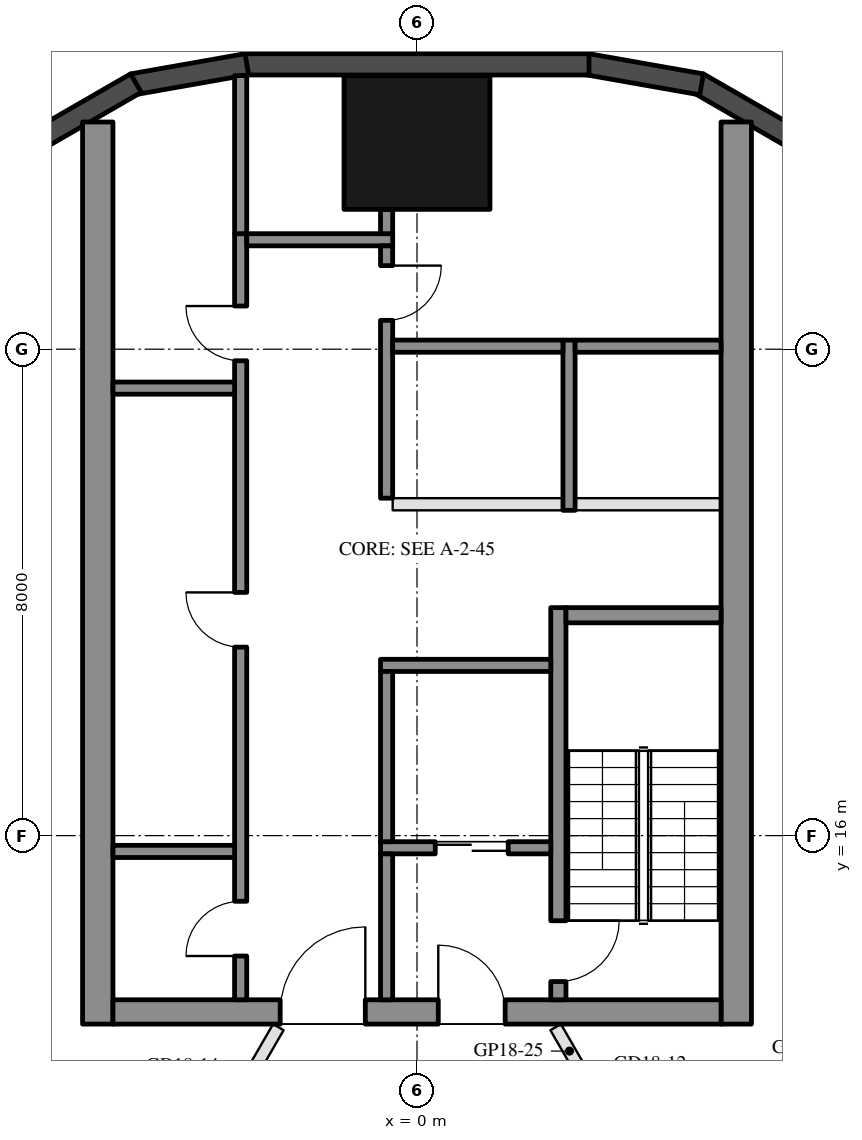
"""IFC4 building model, lengths in metres.
Left out: names, types, materials, properties, quantities, classifications, styles, units other than length and angle.
Written with IfcOpenShell. Run it as: python <this file> out.ifc"""

import sys

from ifc_helpers import new_model, si_unit, direction, frame, frame_2d, origin, origin_2d, place, context, subcontext, project, spatial, rectangle, hollow_rectangle, extrude, element, fill, save


model = new_model("IFC4")
c1 = context("Model", 3, precision=1e-05, world=origin(), true_north=direction((0.0, 1.0)))
c2 = subcontext(c1, "Body", "Model", "MODEL_VIEW")
j1 = project(units=[si_unit("LENGTHUNIT", "METRE"), si_unit("PLANEANGLEUNIT", "RADIAN")], contexts=[c1])
p1 = place(None, origin())
s1 = spatial("IfcSite", under=j1, at=p1, CompositionType="ELEMENT")
p2 = place(p1, origin())
s2 = spatial("IfcBuilding", under=s1, at=p2, CompositionType="ELEMENT")
p3 = place(p2, frame((0.0, 0.0, 194.7)))
s3 = spatial("IfcBuildingStorey", under=s2, at=p3, CompositionType="ELEMENT", Elevation=194.7)
p4 = place(p3, frame((0.0, 27.4, 0.0), z_axis=(0.0, 0.0, 1.0), x_axis=(1.0, 0.0, 0.0)))
e1 = element("IfcColumn", 1, at=p4, inside=s3, PredefinedType="COLUMN", context=c2, shape_type="SweptSolid", body=[
    extrude(hollow_rectangle(XDim=2.4, YDim=2.2, WallThickness=0.06, at=origin_2d()), origin(), (0.0, 0.0, 1.0), 3.7),
])
for number, where, z_axis, x_axis in (
    (2, (6.277, 27.422, 0.0), (0.0, 0.0, 1.0), (-0.866, 0.5, 0.0)),
    (3, (4.68, 28.356, 0.0), (0.0, 0.0, 1.0), (-0.985, 0.174, 0.0)),
):
    element("IfcWall", number, at=place(p3, frame(where, z_axis=z_axis, x_axis=x_axis)), inside=s3, PredefinedType="SOLIDWALL", context=c2, shape_type="SweptSolid", body=[
        extrude(rectangle(XDim=1.91, YDim=0.35, at=frame_2d((0.955, 0.0))), origin(), (0.0, 0.0, 1.0), 3.55),
    ])
p5 = place(p3, frame((2.829, 28.685, 0.0), z_axis=(0.0, 0.0, 1.0), x_axis=(-1.0, 0.0, 0.0)))
e4 = element("IfcWall", 4, at=p5, inside=s3, PredefinedType="SOLIDWALL", context=c2, shape_type="SweptSolid", body=[
    extrude(rectangle(XDim=5.658, YDim=0.35, at=frame_2d((2.829, 0.0))), origin(), (0.0, 0.0, 1.0), 3.55),
])
for number, where, z_axis, x_axis in (
    (5, (-2.799, 28.688, 0.0), (0.0, 0.0, 1.0), (-0.985, -0.174, 0.0)),
    (6, (-4.623, 28.377, 0.0), (0.0, 0.0, 1.0), (-0.866, -0.5, 0.0)),
):
    element("IfcWall", number, at=place(p3, frame(where, z_axis=z_axis, x_axis=x_axis)), inside=s3, PredefinedType="SOLIDWALL", context=c2, shape_type="SweptSolid", body=[
        extrude(rectangle(XDim=1.91, YDim=0.35, at=frame_2d((0.955, 0.0))), origin(), (0.0, 0.0, 1.0), 3.55),
    ])
for number, where, z_axis, x_axis in (
    (7, (5.25, 12.9, 0.0), (0.0, 0.0, 1.0), (0.0, 1.0, 0.0)),
    (8, (-5.25, 12.9, 0.0), (0.0, 0.0, 1.0), (0.0, 1.0, 0.0)),
):
    element("IfcWall", number, at=place(p3, frame(where, z_axis=z_axis, x_axis=x_axis)), inside=s3, PredefinedType="SHEAR", context=c2, shape_type="SweptSolid", body=[
        extrude(rectangle(XDim=14.837, YDim=0.5, at=frame_2d((7.418, 0.0))), origin(), (0.0, 0.0, 1.0), 3.5),
    ])
p6 = place(p3, frame((5.0, 13.1, 0.0), z_axis=(0.0, 0.0, 1.0), x_axis=(-1.0, 0.0, 0.0)))
e9 = element("IfcWall", 9, at=p6, inside=s3, PredefinedType="SHEAR", context=c2, shape_type="SweptSolid", body=[
    extrude(rectangle(XDim=10.0, YDim=0.4, at=frame_2d((5.0, 0.0))), origin(), (0.0, 0.0, 1.0), 3.5),
])
p7 = place(p6, frame((3.55, 0.0, 0.0)))
e10 = element("IfcOpeningElement", 10, at=p7, cuts=e9, PredefinedType="OPENING", context=c2, shape_type="SweptSolid", body=[
    extrude(rectangle(XDim=1.1, YDim=2.1, at=frame_2d((0.55, 1.05))), frame((0.0, 0.21, 0.0), z_axis=(0.0, -1.0, 0.0), x_axis=(1.0, 0.0, 0.0)), (0.0, 0.0, 1.0), 0.42),
])
p8 = place(p6, frame((5.85, 0.0, 0.0)))
e11 = element("IfcOpeningElement", 11, at=p8, cuts=e9, PredefinedType="OPENING", context=c2, shape_type="SweptSolid", body=[
    extrude(rectangle(XDim=1.4, YDim=2.1, at=frame_2d((0.7, 1.05))), frame((0.0, 0.21, 0.0), z_axis=(0.0, -1.0, 0.0), x_axis=(1.0, 0.0, 0.0)), (0.0, 0.0, 1.0), 0.42),
])
p9 = place(p3, frame((2.325, 13.3, 0.0), z_axis=(0.0, 0.0, 1.0), x_axis=(0.0, 1.0, 0.0)))
e12 = element("IfcWall", 12, at=p9, inside=s3, PredefinedType="SHEAR", context=c2, shape_type="SweptSolid", body=[
    extrude(rectangle(XDim=6.45, YDim=0.25, at=frame_2d((3.225, 0.0))), origin(), (0.0, 0.0, 1.0), 3.5),
])
p10 = place(p9, frame((0.3, 0.0, 0.0)))
e13 = element("IfcOpeningElement", 13, at=p10, cuts=e12, PredefinedType="OPENING", context=c2, shape_type="SweptSolid", body=[
    extrude(rectangle(XDim=1.0, YDim=2.1, at=frame_2d((0.5, 1.05))), frame((0.0, 0.135, 0.0), z_axis=(0.0, -1.0, 0.0), x_axis=(1.0, 0.0, 0.0)), (0.0, 0.0, 1.0), 0.27),
])
p11 = place(p3, frame((5.0, 19.625, 0.0), z_axis=(0.0, 0.0, 1.0), x_axis=(-1.0, 0.0, 0.0)))
e14 = element("IfcWall", 14, at=p11, inside=s3, PredefinedType="SHEAR", context=c2, shape_type="SweptSolid", body=[
    extrude(rectangle(XDim=2.55, YDim=0.25, at=frame_2d((1.275, 0.0))), origin(), (0.0, 0.0, 1.0), 3.5),
])
p12 = place(p3, frame((2.2, 18.8, 0.0), z_axis=(0.0, 0.0, 1.0), x_axis=(-1.0, 0.0, 0.0)))
e15 = element("IfcWall", 15, at=p12, inside=s3, PredefinedType="SHEAR", context=c2, shape_type="SweptSolid", body=[
    extrude(rectangle(XDim=2.8, YDim=0.2, at=frame_2d((1.4, 0.0))), origin(), (0.0, 0.0, 1.0), 3.5),
])
p13 = place(p3, frame((2.2, 15.8, 0.0), z_axis=(0.0, 0.0, 1.0), x_axis=(-1.0, 0.0, 0.0)))
e16 = element("IfcWall", 16, at=p13, inside=s3, PredefinedType="SHEAR", context=c2, shape_type="SweptSolid", body=[
    extrude(rectangle(XDim=2.8, YDim=0.2, at=frame_2d((1.4, 0.0))), origin(), (0.0, 0.0, 1.0), 3.5),
])
p14 = place(p13, frame((0.7, 0.0, 0.0)))
e17 = element("IfcOpeningElement", 17, at=p14, cuts=e16, PredefinedType="OPENING", context=c2, shape_type="SweptSolid", body=[
    extrude(rectangle(XDim=1.2, YDim=2.1, at=frame_2d((0.6, 1.05))), frame((0.0, 0.11, 0.0), z_axis=(0.0, -1.0, 0.0), x_axis=(1.0, 0.0, 0.0)), (0.0, 0.0, 1.0), 0.22),
])
p15 = place(p3, frame((-0.5, 15.9, 0.0), z_axis=(0.0, 0.0, 1.0), x_axis=(0.0, 1.0, 0.0)))
e18 = element("IfcWall", 18, at=p15, inside=s3, PredefinedType="SHEAR", context=c2, shape_type="SweptSolid", body=[
    extrude(rectangle(XDim=2.8, YDim=0.2, at=frame_2d((1.4, 0.0))), origin(), (0.0, 0.0, 1.0), 3.5),
])
p16 = place(p3, frame((-0.5, 13.3, 0.0), z_axis=(0.0, 0.0, 1.0), x_axis=(0.0, 1.0, 0.0)))
e19 = element("IfcWall", 19, at=p16, inside=s3, PredefinedType="SHEAR", context=c2, shape_type="SweptSolid", body=[
    extrude(rectangle(XDim=2.4, YDim=0.2, at=frame_2d((1.2, 0.0))), origin(), (0.0, 0.0, 1.0), 3.5),
])
p17 = place(p3, frame((-2.9, 13.3, 0.0), z_axis=(0.0, 0.0, 1.0), x_axis=(0.0, 1.0, 0.0)))
e20 = element("IfcWall", 20, at=p17, inside=s3, PredefinedType="SHEAR", context=c2, shape_type="SweptSolid", body=[
    extrude(rectangle(XDim=12.6, YDim=0.2, at=frame_2d((6.3, 0.0))), origin(), (0.0, 0.0, 1.0), 3.5),
])
p18 = place(p17, frame((0.72, 0.0, 0.0)))
e21 = element("IfcOpeningElement", 21, at=p18, cuts=e20, PredefinedType="OPENING", context=c2, shape_type="SweptSolid", body=[
    extrude(rectangle(XDim=0.9, YDim=2.1, at=frame_2d((0.45, 1.05))), frame((0.0, 0.11, 0.0), z_axis=(0.0, -1.0, 0.0), x_axis=(1.0, 0.0, 0.0)), (0.0, 0.0, 1.0), 0.22),
])
p19 = place(p17, frame((5.8, 0.0, 0.0)))
e22 = element("IfcOpeningElement", 22, at=p19, cuts=e20, PredefinedType="OPENING", context=c2, shape_type="SweptSolid", body=[
    extrude(rectangle(XDim=0.9, YDim=2.1, at=frame_2d((0.45, 1.05))), frame((0.0, 0.11, 0.0), z_axis=(0.0, -1.0, 0.0), x_axis=(1.0, 0.0, 0.0)), (0.0, 0.0, 1.0), 0.22),
])
p20 = place(p17, frame((10.51, 0.0, 0.0)))
e23 = element("IfcOpeningElement", 23, at=p20, cuts=e20, PredefinedType="OPENING", context=c2, shape_type="SweptSolid", body=[
    extrude(rectangle(XDim=0.9, YDim=2.1, at=frame_2d((0.45, 1.05))), frame((0.0, 0.11, 0.0), z_axis=(0.0, -1.0, 0.0), x_axis=(1.0, 0.0, 0.0)), (0.0, 0.0, 1.0), 0.22),
])
p21 = place(p3, frame((-0.4, 25.8, 0.0), z_axis=(0.0, 0.0, 1.0), x_axis=(-1.0, 0.0, 0.0)))
e24 = element("IfcWall", 24, at=p21, inside=s3, PredefinedType="SHEAR", context=c2, shape_type="SweptSolid", body=[
    extrude(rectangle(XDim=2.4, YDim=0.2, at=frame_2d((1.2, 0.0))), origin(), (0.0, 0.0, 1.0), 3.5),
])
p22 = place(p3, frame((-0.5, 21.55, 0.0), z_axis=(0.0, 0.0, 1.0), x_axis=(0.0, 1.0, 0.0)))
e25 = element("IfcWall", 25, at=p22, inside=s3, PredefinedType="SHEAR", context=c2, shape_type="SweptSolid", body=[
    extrude(rectangle(XDim=4.15, YDim=0.2, at=frame_2d((2.075, 0.0))), origin(), (0.0, 0.0, 1.0), 3.5),
])
p23 = place(p22, frame((2.925, 0.0, 0.0)))
e26 = element("IfcOpeningElement", 26, at=p23, cuts=e25, PredefinedType="OPENING", context=c2, shape_type="SweptSolid", body=[
    extrude(rectangle(XDim=0.9, YDim=2.1, at=frame_2d((0.45, 1.05))), frame((0.0, 0.11, 0.0), z_axis=(0.0, -1.0, 0.0), x_axis=(1.0, 0.0, 0.0)), (0.0, 0.0, 1.0), 0.22),
])
for number, where, z_axis, x_axis in (
    (27, (-3.0, 15.74, 0.0), (0.0, 0.0, 1.0), (-1.0, 0.0, 0.0)),
    (28, (-3.0, 23.36, 0.0), (0.0, 0.0, 1.0), (-1.0, 0.0, 0.0)),
):
    element("IfcWall", number, at=place(p3, frame(where, z_axis=z_axis, x_axis=x_axis)), inside=s3, PredefinedType="SHEAR", context=c2, shape_type="SweptSolid", body=[
        extrude(rectangle(XDim=2.0, YDim=0.2, at=frame_2d((1.0, 0.0))), origin(), (0.0, 0.0, 1.0), 3.5),
    ])
p24 = place(p3, frame((-0.5, 25.9, 0.0), z_axis=(0.0, 0.0, 1.0), x_axis=(0.0, 1.0, 0.0)))
e29 = element("IfcWall", 29, at=p24, inside=s3, PredefinedType="SHEAR", context=c2, shape_type="SweptSolid", body=[
    extrude(rectangle(XDim=0.4, YDim=0.2, at=frame_2d((0.2, 0.0))), origin(), (0.0, 0.0, 1.0), 3.5),
])
p25 = place(p3, frame((-2.9, 25.9, 0.0), z_axis=(0.0, 0.0, 1.0), x_axis=(0.0, 1.0, 0.0)))
e30 = element("IfcWall", 30, at=p25, inside=s3, PredefinedType="SHEAR", context=c2, shape_type="SweptSolid", body=[
    extrude(rectangle(XDim=2.6, YDim=0.2, at=frame_2d((1.3, 0.0))), origin(), (0.0, 0.0, 1.0), 3.5),
])
p26 = place(p3, frame((2.5, 21.35, 0.0), z_axis=(0.0, 0.0, 1.0), x_axis=(0.0, 1.0, 0.0)))
e31 = element("IfcWall", 31, at=p26, inside=s3, PredefinedType="SHEAR", context=c2, shape_type="SweptSolid", body=[
    extrude(rectangle(XDim=2.8, YDim=0.2, at=frame_2d((1.4, 0.0))), origin(), (0.0, 0.0, 1.0), 3.5),
])
p27 = place(p3, frame((5.0, 24.05, 0.0), z_axis=(0.0, 0.0, 1.0), x_axis=(-1.0, 0.0, 0.0)))
e32 = element("IfcWall", 32, at=p27, inside=s3, PredefinedType="SHEAR", context=c2, shape_type="SweptSolid", body=[
    extrude(rectangle(XDim=2.4, YDim=0.2, at=frame_2d((1.2, 0.0))), origin(), (0.0, 0.0, 1.0), 3.5),
])
p28 = place(p3, frame((2.4, 24.05, 0.0), z_axis=(0.0, 0.0, 1.0), x_axis=(-1.0, 0.0, 0.0)))
e33 = element("IfcWall", 33, at=p28, inside=s3, PredefinedType="SHEAR", context=c2, shape_type="SweptSolid", body=[
    extrude(rectangle(XDim=2.8, YDim=0.2, at=frame_2d((1.4, 0.0))), origin(), (0.0, 0.0, 1.0), 3.5),
])
p29 = place(p3, frame((5.0, 21.45, 0.0), z_axis=(0.0, 0.0, 1.0), x_axis=(-1.0, 0.0, 0.0)))
e34 = element("IfcWall", 34, at=p29, inside=s3, PredefinedType="PARTITIONING", context=c2, shape_type="SweptSolid", body=[
    extrude(rectangle(XDim=2.4, YDim=0.2, at=frame_2d((1.2, 0.0))), origin(), (0.0, 0.0, 1.0), 3.5),
])
p30 = place(p3, frame((2.4, 21.45, 0.0), z_axis=(0.0, 0.0, 1.0), x_axis=(-1.0, 0.0, 0.0)))
e35 = element("IfcWall", 35, at=p30, inside=s3, PredefinedType="PARTITIONING", context=c2, shape_type="SweptSolid", body=[
    extrude(rectangle(XDim=2.8, YDim=0.2, at=frame_2d((1.4, 0.0))), origin(), (0.0, 0.0, 1.0), 3.5),
])
p31 = place(p3, frame((13.647, 14.923, 0.0), z_axis=(0.0, 0.0, 1.0), x_axis=(-0.866027479907, -0.499996404033, 0.0)))
e36 = element("IfcWall", 36, at=p31, inside=s3, PredefinedType="PARTITIONING", context=c2, shape_type="SweptSolid", body=[
    extrude(rectangle(XDim=10.98, YDim=0.2, at=frame_2d((5.49, 0.0))), origin(), (0.0, 0.0, 1.0), 3.06),
])
p32 = place(p3, frame((-13.192, 13.91, 0.0), z_axis=(0.0, 0.0, 1.0), x_axis=(0.892469554868, -0.451107629766, 0.0)))
e37 = element("IfcWall", 37, at=p32, inside=s3, PredefinedType="PARTITIONING", context=c2, shape_type="SweptSolid", body=[
    extrude(rectangle(XDim=10.096, YDim=0.2, at=frame_2d((5.048, 0.0))), origin(), (0.0, 0.0, 1.0), 3.06),
])
p33 = place(p3, frame((2.281, 12.85, 0.0), z_axis=(0.0, 0.0, 1.0), x_axis=(0.499979074716, -0.866037484666, 0.0)))
e38 = element("IfcWall", 38, at=p33, inside=s3, PredefinedType="PARTITIONING", context=c2, shape_type="SweptSolid", body=[
    extrude(rectangle(XDim=3.788, YDim=0.2, at=frame_2d((1.894, 0.0))), origin(), (0.0, 0.0, 1.0), 2.95),
])
p34 = place(p33, frame((1.394, 0.0, 0.0)))
e39 = element("IfcOpeningElement", 39, at=p34, cuts=e38, PredefinedType="OPENING", context=c2, shape_type="SweptSolid", body=[
    extrude(rectangle(XDim=1.0, YDim=2.1, at=frame_2d((0.5, 1.05))), frame((0.0, 0.11, 0.0), z_axis=(0.0, -1.0, 0.0), x_axis=(1.0, 0.0, 0.0)), (0.0, 0.0, 1.0), 0.22),
])
p35 = place(p3, frame((-4.222, 9.488, 0.0), z_axis=(0.0, 0.0, 1.0), x_axis=(0.49998736472, 0.866032698644, 0.0)))
e40 = element("IfcWall", 40, at=p35, inside=s3, PredefinedType="PARTITIONING", context=c2, shape_type="SweptSolid", body=[
    extrude(rectangle(XDim=3.882, YDim=0.2, at=frame_2d((1.941, 0.0))), origin(), (0.0, 0.0, 1.0), 2.95),
])
p36 = place(p35, frame((1.441, 0.0, 0.0)))
e41 = element("IfcOpeningElement", 41, at=p36, cuts=e40, PredefinedType="OPENING", context=c2, shape_type="SweptSolid", body=[
    extrude(rectangle(XDim=1.0, YDim=2.1, at=frame_2d((0.5, 1.05))), frame((0.0, 0.11, 0.0), z_axis=(0.0, -1.0, 0.0), x_axis=(1.0, 0.0, 0.0)), (0.0, 0.0, 1.0), 0.22),
])
p37 = place(p14, origin())
e42 = element("IfcDoor", 42, at=p37, inside=s3, OperationType="DOUBLE_DOOR_SLIDING", PredefinedType="DOOR", context=c2, shape_type="SweptSolid", body=[
    extrude(rectangle(XDim=1.2, YDim=2.1, at=frame_2d((0.6, 1.05))), frame((0.0, 0.025, 0.0), z_axis=(0.0, -1.0, 0.0), x_axis=(1.0, 0.0, 0.0)), (0.0, 0.0, 1.0), 0.05),
])
fill(e17, e42)
p38 = place(p18, origin())
e43 = element("IfcDoor", 43, at=p38, inside=s3, OperationType="SINGLE_SWING_LEFT", PredefinedType="DOOR", context=c2, shape_type="SweptSolid", body=[
    extrude(rectangle(XDim=0.9, YDim=2.1, at=frame_2d((0.45, 1.05))), frame((0.0, 0.025, 0.0), z_axis=(0.0, -1.0, 0.0), x_axis=(1.0, 0.0, 0.0)), (0.0, 0.0, 1.0), 0.05),
])
fill(e21, e43)
p39 = place(p19, origin())
e44 = element("IfcDoor", 44, at=p39, inside=s3, OperationType="SINGLE_SWING_RIGHT", PredefinedType="DOOR", context=c2, shape_type="SweptSolid", body=[
    extrude(rectangle(XDim=0.9, YDim=2.1, at=frame_2d((0.45, 1.05))), frame((0.0, 0.025, 0.0), z_axis=(0.0, -1.0, 0.0), x_axis=(1.0, 0.0, 0.0)), (0.0, 0.0, 1.0), 0.05),
])
fill(e22, e44)
p40 = place(p20, origin())
e45 = element("IfcDoor", 45, at=p40, inside=s3, OperationType="SINGLE_SWING_RIGHT", PredefinedType="DOOR", context=c2, shape_type="SweptSolid", body=[
    extrude(rectangle(XDim=0.9, YDim=2.1, at=frame_2d((0.45, 1.05))), frame((0.0, 0.025, 0.0), z_axis=(0.0, -1.0, 0.0), x_axis=(1.0, 0.0, 0.0)), (0.0, 0.0, 1.0), 0.05),
])
fill(e23, e45)
p41 = place(p23, frame((0.9, 0.0, 0.0), z_axis=(0.0, 0.0, 1.0), x_axis=(-1.0, 0.0, 0.0)))
e46 = element("IfcDoor", 46, at=p41, inside=s3, OperationType="SINGLE_SWING_LEFT", PredefinedType="DOOR", context=c2, shape_type="SweptSolid", body=[
    extrude(rectangle(XDim=0.9, YDim=2.1, at=frame_2d((0.45, 1.05))), frame((0.0, 0.025, 0.0), z_axis=(0.0, -1.0, 0.0), x_axis=(1.0, 0.0, 0.0)), (0.0, 0.0, 1.0), 0.05),
])
fill(e26, e46)
p42 = place(p7, frame((1.1, 0.0, 0.0), z_axis=(0.0, 0.0, 1.0), x_axis=(-1.0, 0.0, 0.0)))
e47 = element("IfcDoor", 47, at=p42, inside=s3, OperationType="SINGLE_SWING_LEFT", PredefinedType="DOOR", context=c2, shape_type="SweptSolid", body=[
    extrude(rectangle(XDim=1.1, YDim=2.1, at=frame_2d((0.55, 1.05))), frame((0.0, 0.025, 0.0), z_axis=(0.0, -1.0, 0.0), x_axis=(1.0, 0.0, 0.0)), (0.0, 0.0, 1.0), 0.05),
])
fill(e10, e47)
p43 = place(p8, frame((1.4, 0.0, 0.0), z_axis=(0.0, 0.0, 1.0), x_axis=(-1.0, 0.0, 0.0)))
e48 = element("IfcDoor", 48, at=p43, inside=s3, OperationType="DOUBLE_DOOR_SINGLE_SWING", PredefinedType="DOOR", context=c2, shape_type="SweptSolid", body=[
    extrude(rectangle(XDim=1.4, YDim=2.1, at=frame_2d((0.7, 1.05))), frame((0.0, 0.025, 0.0), z_axis=(0.0, -1.0, 0.0), x_axis=(1.0, 0.0, 0.0)), (0.0, 0.0, 1.0), 0.05),
])
fill(e11, e48)
p44 = place(p10, frame((1.0, 0.0, 0.0), z_axis=(0.0, 0.0, 1.0), x_axis=(-1.0, 0.0, 0.0)))
e49 = element("IfcDoor", 49, at=p44, inside=s3, OperationType="SINGLE_SWING_LEFT", PredefinedType="DOOR", context=c2, shape_type="SweptSolid", body=[
    extrude(rectangle(XDim=1.0, YDim=2.1, at=frame_2d((0.5, 1.05))), frame((0.0, 0.025, 0.0), z_axis=(0.0, -1.0, 0.0), x_axis=(1.0, 0.0, 0.0)), (0.0, 0.0, 1.0), 0.05),
])
fill(e13, e49)
save(model, sys.argv[1])
